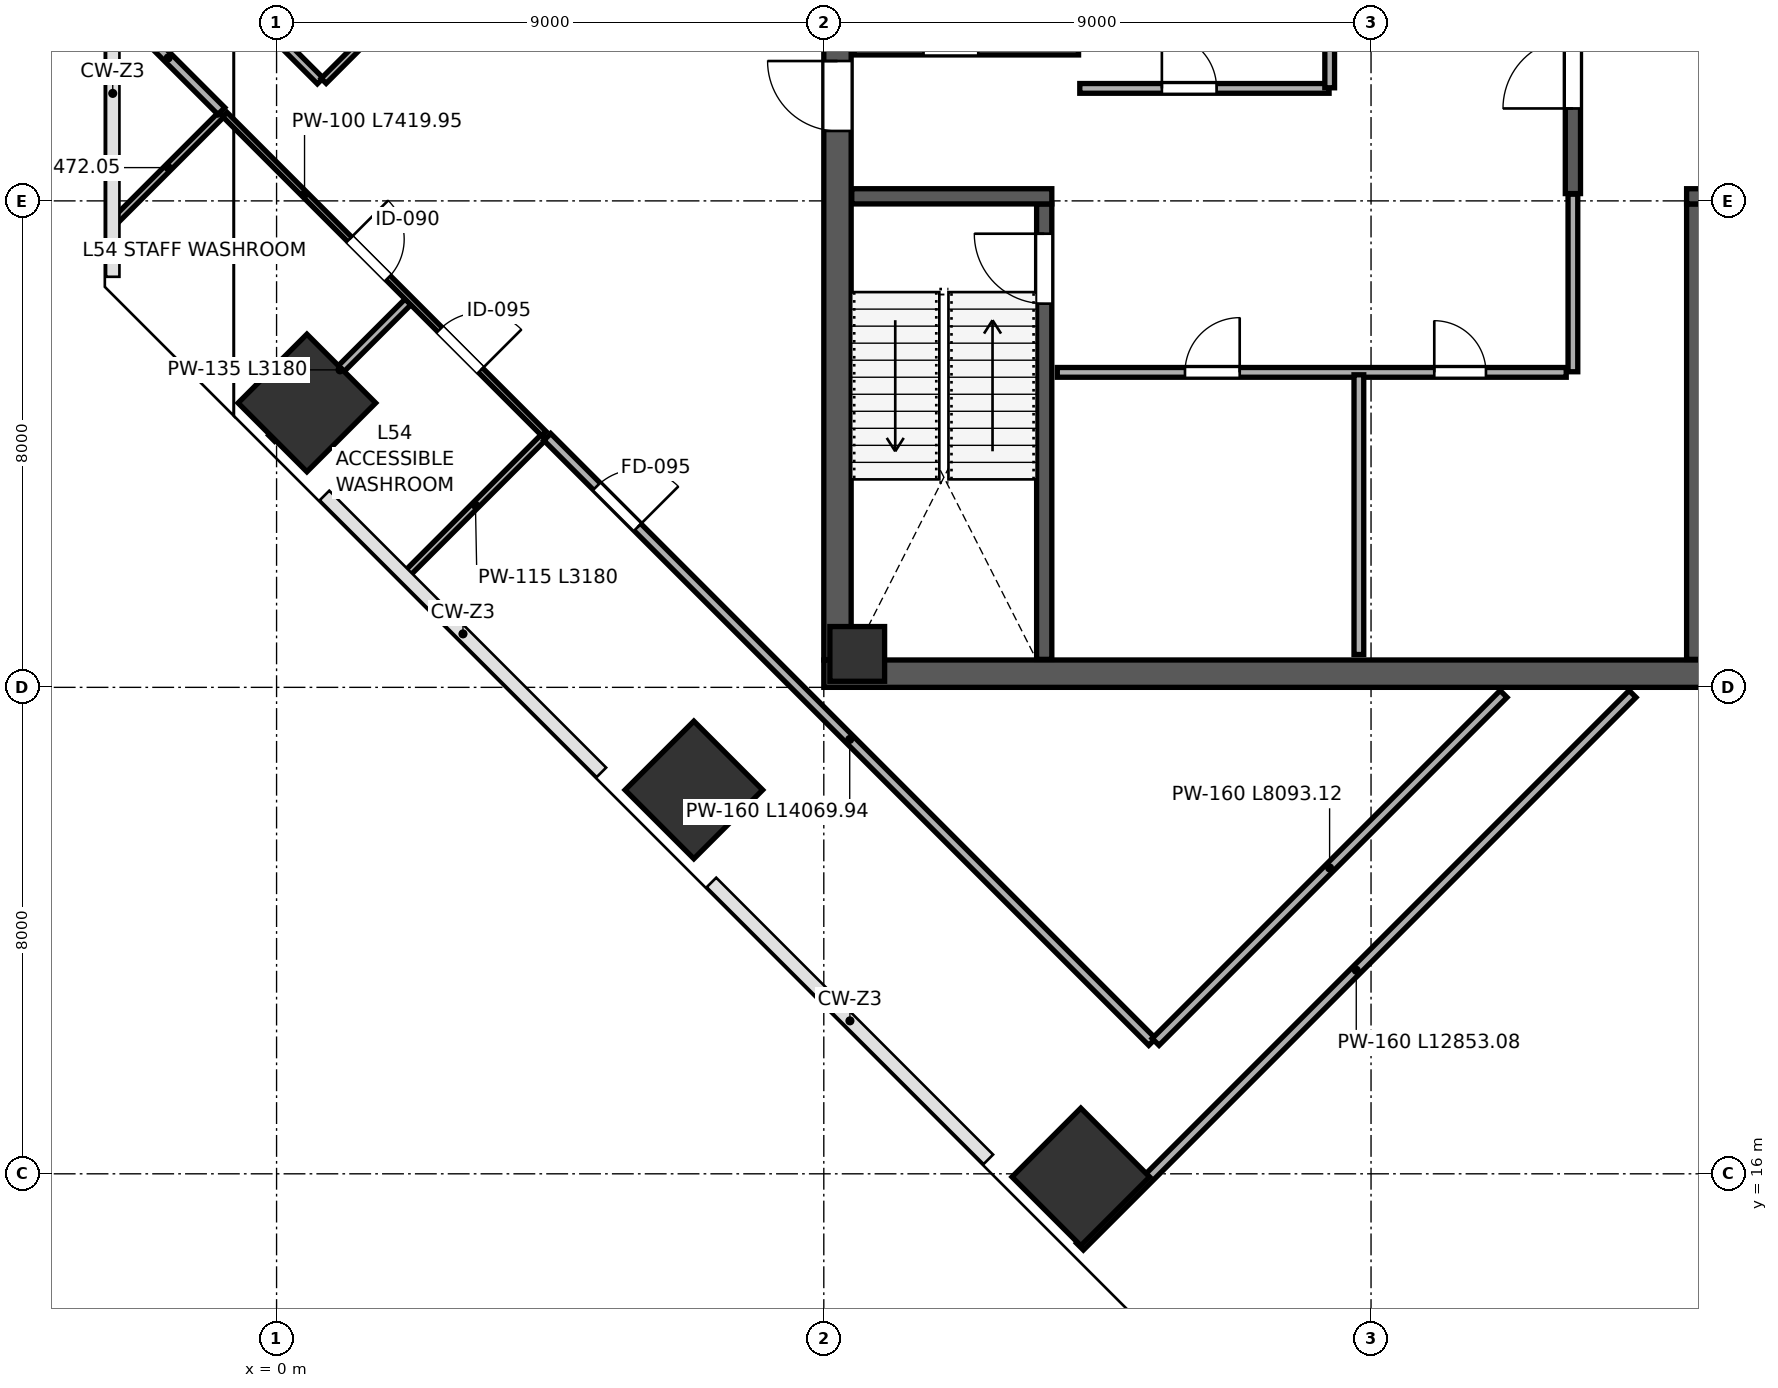
"""IFC4 building model, lengths in metres.
Left out: names, types, materials, properties, quantities, classifications, styles, units other than length and angle.
Written with IfcOpenShell. Run it as: python <this file> out.ifc"""

import sys

from ifc_helpers import new_model, si_unit, direction, frame, frame_2d, origin, origin_2d, place, context, subcontext, project, spatial, rectangle, extrude, source, transform, mapped, element, fill, save


model = new_model("IFC4")
c1 = context("Model", 3, precision=1e-05, world=origin(), true_north=direction((0.0, 1.0)))
c2 = subcontext(c1, "Body", "Model", "MODEL_VIEW")
j1 = project(units=[si_unit("LENGTHUNIT", "METRE"), si_unit("PLANEANGLEUNIT", "RADIAN")], contexts=[c1])
p1 = place(None, origin())
s1 = spatial("IfcSite", under=j1, at=p1, CompositionType="ELEMENT")
p2 = place(p1, origin())
s2 = spatial("IfcBuilding", under=s1, at=p2, CompositionType="ELEMENT")
p3 = place(p2, frame((0.0, 0.0, 241.6)))
s3 = spatial("IfcBuildingStorey", under=s2, at=p3, CompositionType="ELEMENT", Elevation=241.6)
m1 = source(origin(), c2, "Body", "SweptSolid", [
    extrude(rectangle(XDim=0.9, YDim=0.9, at=origin_2d()), origin(), (0.0, 0.0, 1.0), 4.198),
])
p4 = place(p3, frame((9.55, 24.55, 0.001), z_axis=(0.0, 0.0, 1.0), x_axis=(1.0, 0.0, 0.0)))
e1 = element("IfcColumn", 1, at=p4, inside=s3, PredefinedType="COLUMN", context=c2, shape_type="MappedRepresentation", body=[
    mapped(m1, transform((0.0, 0.0, 0.0), scale=1.0)),
])
m2 = source(origin(), c2, "Body", "SweptSolid", [
    extrude(rectangle(XDim=1.6, YDim=1.6, at=origin_2d()), origin(), (0.0, 0.0, 1.0), 4.198),
])
for number, where, z_axis, x_axis in (
    (2, (0.499, 28.677, 0.001), (0.0, 0.0, 1.0), (-0.707, 0.707, 0.0)),
    (3, (6.863, 22.312, 0.001), (0.0, 0.0, 1.0), (-0.707, 0.707, 0.0)),
    (4, (13.227, 15.949, 0.001), (0.0, 0.0, 1.0), (-0.707, 0.707, 0.0)),
):
    element("IfcColumn", number, at=place(p3, frame(where, z_axis=z_axis, x_axis=x_axis)), inside=s3, PredefinedType="COLUMN", context=c2, shape_type="MappedRepresentation", body=[
        mapped(m2, transform((0.0, 0.0, 0.0), scale=1.0)),
    ])
p5 = place(p3, frame((9.225, 24.45, 0.0), z_axis=(0.0, 0.0, 1.0), x_axis=(0.0, 1.0, 0.0)))
e5 = element("IfcWall", 5, at=p5, inside=s3, PredefinedType="SHEAR", context=c2, shape_type="SweptSolid", body=[
    extrude(rectangle(XDim=15.1, YDim=0.45, at=frame_2d((7.55, 0.0))), origin(), (0.0, 0.0, 1.0), 3.96),
])
p6 = place(p5, frame((8.7, 0.0, 0.0)))
e6 = element("IfcOpeningElement", 6, at=p6, cuts=e5, PredefinedType="OPENING", context=c2, shape_type="SweptSolid", body=[
    extrude(rectangle(XDim=1.15, YDim=2.2, at=frame_2d((0.575, 1.1))), frame((0.0, 0.235, 0.0), z_axis=(0.0, -1.0, 0.0), x_axis=(1.0, 0.0, 0.0)), (0.0, 0.0, 1.0), 0.47),
])
p7 = place(p3, frame((9.0, 24.225, 0.0), z_axis=(0.0, 0.0, 1.0), x_axis=(1.0, 0.0, 0.0)))
e7 = element("IfcWall", 7, at=p7, inside=s3, PredefinedType="SHEAR", context=c2, shape_type="SweptSolid", body=[
    extrude(rectangle(XDim=18.0, YDim=0.45, at=frame_2d((9.0, 0.0))), origin(), (0.0, 0.0, 1.0), 3.96),
])
p8 = place(p3, frame((12.625, 24.46, 0.0), z_axis=(0.0, 0.0, 1.0), x_axis=(0.0, 1.0, 0.0)))
e8 = element("IfcWall", 8, at=p8, inside=s3, PredefinedType="SHEAR", context=c2, shape_type="SweptSolid", body=[
    extrude(rectangle(XDim=7.49, YDim=0.25, at=frame_2d((3.745, 0.0))), origin(), (0.0, 0.0, 1.0), 3.96),
])
p9 = place(p8, frame((5.85, 0.0, 0.0)))
e9 = element("IfcOpeningElement", 9, at=p9, cuts=e8, PredefinedType="OPENING", context=c2, shape_type="SweptSolid", body=[
    extrude(rectangle(XDim=1.15, YDim=2.2, at=frame_2d((0.575, 1.1))), frame((0.0, 0.135, 0.0), z_axis=(0.0, -1.0, 0.0), x_axis=(1.0, 0.0, 0.0)), (0.0, 0.0, 1.0), 0.27),
])
p10 = place(p3, frame((9.46, 32.075, 0.0), z_axis=(0.0, 0.0, 1.0), x_axis=(1.0, 0.0, 0.0)))
e10 = element("IfcWall", 10, at=p10, inside=s3, PredefinedType="SHEAR", context=c2, shape_type="SweptSolid", body=[
    extrude(rectangle(XDim=3.29, YDim=0.25, at=frame_2d((1.645, 0.0))), origin(), (0.0, 0.0, 1.0), 3.96),
])
p11 = place(p3, frame((23.315, 24.46, 0.0), z_axis=(0.0, 0.0, 1.0), x_axis=(0.0, 1.0, 0.0)))
e11 = element("IfcWall", 11, at=p11, inside=s3, PredefinedType="SHEAR", context=c2, shape_type="SweptSolid", body=[
    extrude(rectangle(XDim=7.49, YDim=0.25, at=frame_2d((3.745, 0.0))), origin(), (0.0, 0.0, 1.0), 3.96),
])
p12 = place(p3, frame((23.19, 32.075, 0.0), z_axis=(0.0, 0.0, 1.0), x_axis=(1.0, 0.0, 0.0)))
e12 = element("IfcWall", 12, at=p12, inside=s3, PredefinedType="SHEAR", context=c2, shape_type="SweptSolid", body=[
    extrude(rectangle(XDim=3.35, YDim=0.25, at=frame_2d((1.675, 0.0))), origin(), (0.0, 0.0, 1.0), 3.96),
])
p13 = place(p12, frame((0.85, 0.0, 0.0)))
e13 = element("IfcOpeningElement", 13, at=p13, cuts=e12, PredefinedType="OPENING", context=c2, shape_type="SweptSolid", body=[
    extrude(rectangle(XDim=1.15, YDim=2.2, at=frame_2d((0.575, 1.1))), frame((0.0, 0.135, 0.0), z_axis=(0.0, -1.0, 0.0), x_axis=(1.0, 0.0, 0.0)), (0.0, 0.0, 1.0), 0.27),
])
p14 = place(p3, frame((21.32, 32.12, 0.0), z_axis=(0.0, 0.0, 1.0), x_axis=(0.0, 1.0, 0.0)))
e14 = element("IfcWall", 14, at=p14, inside=s3, PredefinedType="SHEAR", context=c2, shape_type="SweptSolid", body=[
    extrude(rectangle(XDim=7.42, YDim=0.25, at=frame_2d((3.71, 0.0))), origin(), (0.0, 0.0, 1.0), 3.96),
])
p15 = place(p14, frame((1.4, 0.0, 0.0)))
e15 = element("IfcOpeningElement", 15, at=p15, cuts=e14, PredefinedType="OPENING", context=c2, shape_type="SweptSolid", body=[
    extrude(rectangle(XDim=1.15, YDim=2.2, at=frame_2d((0.575, 1.1))), frame((0.0, 0.135, 0.0), z_axis=(0.0, -1.0, 0.0), x_axis=(1.0, 0.0, 0.0)), (0.0, 0.0, 1.0), 0.27),
])
p16 = place(p3, frame((9.49, 34.48, 0.0), z_axis=(0.0, 0.0, 1.0), x_axis=(1.0, 0.0, 0.0)))
e16 = element("IfcWall", 16, at=p16, inside=s3, PredefinedType="PARTITIONING", context=c2, shape_type="SweptSolid", body=[
    extrude(rectangle(XDim=3.7, YDim=0.16, at=frame_2d((1.85, 0.0))), origin(), (0.0, 0.0, 1.0), 3.96),
])
p17 = place(p16, frame((1.15, 0.0, 0.0)))
e17 = element("IfcOpeningElement", 17, at=p17, cuts=e16, PredefinedType="OPENING", context=c2, shape_type="SweptSolid", body=[
    extrude(rectangle(XDim=0.9, YDim=2.15, at=frame_2d((0.45, 1.075))), frame((0.0, 0.09, 0.0), z_axis=(0.0, -1.0, 0.0), x_axis=(1.0, 0.0, 0.0)), (0.0, 0.0, 1.0), 0.18),
])
p18 = place(p3, frame((13.21, 33.85, 0.0), z_axis=(0.0, 0.0, 1.0), x_axis=(1.0, 0.0, 0.0)))
e18 = element("IfcWall", 18, at=p18, inside=s3, PredefinedType="PARTITIONING", context=c2, shape_type="SweptSolid", body=[
    extrude(rectangle(XDim=4.1, YDim=0.16, at=frame_2d((2.05, 0.0))), origin(), (0.0, 0.0, 1.0), 3.96),
])
p19 = place(p18, frame((1.35, 0.0, 0.0)))
e19 = element("IfcOpeningElement", 19, at=p19, cuts=e18, PredefinedType="OPENING", context=c2, shape_type="SweptSolid", body=[
    extrude(rectangle(XDim=0.9, YDim=2.15, at=frame_2d((0.45, 1.075))), frame((0.0, 0.09, 0.0), z_axis=(0.0, -1.0, 0.0), x_axis=(1.0, 0.0, 0.0)), (0.0, 0.0, 1.0), 0.18),
])
p20 = place(p3, frame((17.32, 33.86, 0.0), z_axis=(0.0, 0.0, 1.0), x_axis=(0.0, 1.0, 0.0)))
e20 = element("IfcWall", 20, at=p20, inside=s3, PredefinedType="PARTITIONING", context=c2, shape_type="SweptSolid", body=[
    extrude(rectangle(XDim=1.93, YDim=0.16, at=frame_2d((0.965, 0.0))), origin(), (0.0, 0.0, 1.0), 3.96),
])
p21 = place(p3, frame((12.84, 29.18, 0.0), z_axis=(0.0, 0.0, 1.0), x_axis=(1.0, 0.0, 0.0)))
e21 = element("IfcWall", 21, at=p21, inside=s3, PredefinedType="PARTITIONING", context=c2, shape_type="SweptSolid", body=[
    extrude(rectangle(XDim=8.37, YDim=0.16, at=frame_2d((4.185, 0.0))), origin(), (0.0, 0.0, 1.0), 3.96),
])
p22 = place(p21, frame((2.1, 0.0, 0.0)))
e22 = element("IfcOpeningElement", 22, at=p22, cuts=e21, PredefinedType="OPENING", context=c2, shape_type="SweptSolid", body=[
    extrude(rectangle(XDim=0.9, YDim=2.15, at=frame_2d((0.45, 1.075))), frame((0.0, 0.09, 0.0), z_axis=(0.0, -1.0, 0.0), x_axis=(1.0, 0.0, 0.0)), (0.0, 0.0, 1.0), 0.18),
])
p23 = place(p21, frame((6.2, 0.0, 0.0)))
e23 = element("IfcOpeningElement", 23, at=p23, cuts=e21, PredefinedType="OPENING", context=c2, shape_type="SweptSolid", body=[
    extrude(rectangle(XDim=0.85, YDim=2.1, at=frame_2d((0.425, 1.05))), frame((0.0, 0.09, 0.0), z_axis=(0.0, -1.0, 0.0), x_axis=(1.0, 0.0, 0.0)), (0.0, 0.0, 1.0), 0.18),
])
p24 = place(p3, frame((17.8, 24.54, 0.0), z_axis=(0.0, 0.0, 1.0), x_axis=(0.0, 1.0, 0.0)))
e24 = element("IfcWall", 24, at=p24, inside=s3, PredefinedType="PARTITIONING", context=c2, shape_type="SweptSolid", body=[
    extrude(rectangle(XDim=4.6, YDim=0.16, at=frame_2d((2.3, 0.0))), origin(), (0.0, 0.0, 1.0), 3.96),
])
p25 = place(p3, frame((21.32, 29.19, 0.0), z_axis=(0.0, 0.0, 1.0), x_axis=(0.0, 1.0, 0.0)))
e25 = element("IfcWall", 25, at=p25, inside=s3, PredefinedType="PARTITIONING", context=c2, shape_type="SweptSolid", body=[
    extrude(rectangle(XDim=2.92, YDim=0.16, at=frame_2d((1.46, 0.0))), origin(), (0.0, 0.0, 1.0), 3.96),
])
p26 = place(p3, frame((-2.656, 31.673, 0.0), z_axis=(0.0, 0.0, 1.0), x_axis=(0.707106781187, 0.707106781187, 0.0)))
e26 = element("IfcWall", 26, at=p26, inside=s3, PredefinedType="PARTITIONING", context=c2, shape_type="SweptSolid", body=[
    extrude(rectangle(XDim=2.472, YDim=0.115, at=frame_2d((1.236, 0.0))), origin(), (0.0, 0.0, 1.0), 3.96),
])
p27 = place(p3, frame((-2.656, 35.226, 0.0), z_axis=(0.0, 0.0, 1.0), x_axis=(0.707106781187, -0.707106781187, 0.0)))
e27 = element("IfcWall", 27, at=p27, inside=s3, PredefinedType="PARTITIONING", context=c2, shape_type="SweptSolid", body=[
    extrude(rectangle(XDim=2.472, YDim=0.16, at=frame_2d((1.236, 0.0))), origin(), (0.0, 0.0, 1.0), 3.96),
])
p28 = place(p3, frame((-0.081, 28.097, 0.0), z_axis=(0.0, 0.0, 1.0), x_axis=(0.707068394238, 0.707145166051, 0.0)))
e28 = element("IfcWall", 28, at=p28, inside=s3, PredefinedType="PARTITIONING", context=c2, shape_type="SweptSolid", body=[
    extrude(rectangle(XDim=3.18, YDim=0.135, at=frame_2d((1.59, 0.0))), origin(), (0.0, 0.0, 1.0), 3.195),
])
p29 = place(p3, frame((2.146, 25.869, 0.0), z_axis=(0.0, 0.0, 1.0), x_axis=(0.707106781187, 0.707106781187, 0.0)))
e29 = element("IfcWall", 29, at=p29, inside=s3, PredefinedType="PARTITIONING", context=c2, shape_type="SweptSolid", body=[
    extrude(rectangle(XDim=3.18, YDim=0.115, at=frame_2d((1.59, 0.0))), origin(), (0.0, 0.0, 1.0), 3.195),
])
p30 = place(p3, frame((-0.852, 33.421, 0.0), z_axis=(0.0, 0.0, 1.0), x_axis=(0.707090329382, -0.707123232608, 0.0)))
e30 = element("IfcWall", 30, at=p30, inside=s3, PredefinedType="PARTITIONING", context=c2, shape_type="SweptSolid", body=[
    extrude(rectangle(XDim=7.42, YDim=0.1, at=frame_2d((3.71, 0.0))), origin(), (0.0, 0.0, 1.0), 3.96),
])
p31 = place(p30, frame((2.9, 0.0, 0.0)))
e31 = element("IfcOpeningElement", 31, at=p31, cuts=e30, PredefinedType="OPENING", context=c2, shape_type="SweptSolid", body=[
    extrude(rectangle(XDim=0.9, YDim=2.15, at=frame_2d((0.45, 1.075))), frame((0.0, 0.06, 0.0), z_axis=(0.0, -1.0, 0.0), x_axis=(1.0, 0.0, 0.0)), (0.0, 0.0, 1.0), 0.12),
])
p32 = place(p30, frame((5.0, 0.0, 0.0)))
e32 = element("IfcOpeningElement", 32, at=p32, cuts=e30, PredefinedType="OPENING", context=c2, shape_type="SweptSolid", body=[
    extrude(rectangle(XDim=0.95, YDim=2.15, at=frame_2d((0.475, 1.075))), frame((0.0, 0.06, 0.0), z_axis=(0.0, -1.0, 0.0), x_axis=(1.0, 0.0, 0.0)), (0.0, 0.0, 1.0), 0.12),
])
p33 = place(p3, frame((4.452, 28.118, 0.0), z_axis=(0.0, 0.0, 1.0), x_axis=(0.707106781187, -0.707106781187, 0.0)))
e33 = element("IfcWall", 33, at=p33, inside=s3, PredefinedType="PARTITIONING", context=c2, shape_type="SweptSolid", body=[
    extrude(rectangle(XDim=14.07, YDim=0.16, at=frame_2d((7.035, 0.0))), origin(), (0.0, 0.0, 1.0), 3.96),
])
p34 = place(p33, frame((1.15, 0.0, 0.0)))
e34 = element("IfcOpeningElement", 34, at=p34, cuts=e33, PredefinedType="OPENING", context=c2, shape_type="SweptSolid", body=[
    extrude(rectangle(XDim=0.95, YDim=2.15, at=frame_2d((0.475, 1.075))), frame((0.0, 0.09, 0.0), z_axis=(0.0, -1.0, 0.0), x_axis=(1.0, 0.0, 0.0)), (0.0, 0.0, 1.0), 0.18),
])
p35 = place(p3, frame((14.457, 18.169, 0.0), z_axis=(0.0, 0.0, 1.0), x_axis=(0.707106781187, 0.707106781187, 0.0)))
e35 = element("IfcWall", 35, at=p35, inside=s3, PredefinedType="PARTITIONING", context=c2, shape_type="SweptSolid", body=[
    extrude(rectangle(XDim=8.093, YDim=0.16, at=frame_2d((4.046, 0.0))), origin(), (0.0, 0.0, 1.0), 3.96),
])
p36 = place(p3, frame((-2.414, 37.105, 0.0), z_axis=(0.0, 0.0, 1.0), x_axis=(0.707106781187, -0.707106781187, 0.0)))
e36 = element("IfcWall", 36, at=p36, inside=s3, PredefinedType="PARTITIONING", context=c2, shape_type="SweptSolid", body=[
    extrude(rectangle(XDim=4.43, YDim=0.135, at=frame_2d((2.215, 0.0))), origin(), (0.0, 0.0, 1.0), 3.96),
])
p37 = place(p3, frame((0.775, 33.973, 0.0), z_axis=(0.0, 0.0, 1.0), x_axis=(0.707106781187, 0.707106781187, 0.0)))
e37 = element("IfcWall", 37, at=p37, inside=s3, PredefinedType="PARTITIONING", context=c2, shape_type="SweptSolid", body=[
    extrude(rectangle(XDim=29.28, YDim=0.115, at=frame_2d((14.64, 0.0))), origin(), (0.0, 0.0, 1.0), 3.96),
])
p38 = place(p37, frame((2.2, 0.0, 0.0)))
e38 = element("IfcOpeningElement", 38, at=p38, cuts=e37, PredefinedType="OPENING", context=c2, shape_type="SweptSolid", body=[
    extrude(rectangle(XDim=0.95, YDim=2.15, at=frame_2d((0.475, 1.075))), frame((0.0, 0.067, 0.0), z_axis=(0.0, -1.0, 0.0), x_axis=(1.0, 0.0, 0.0)), (0.0, 0.0, 1.0), 0.135),
])
p39 = place(p3, frame((13.213, 14.803, 0.0), z_axis=(0.0, 0.0, 1.0), x_axis=(0.707116278481, 0.707097283765, 0.0)))
e39 = element("IfcWall", 39, at=p39, inside=s3, PredefinedType="PARTITIONING", context=c2, shape_type="SweptSolid", body=[
    extrude(rectangle(XDim=12.853, YDim=0.16, at=frame_2d((6.427, 0.0))), origin(), (0.0, 0.0, 1.0), 3.96),
])
m3 = source(origin(), c2, "Body", "SweptSolid", [
    extrude(rectangle(XDim=1.15, YDim=2.2, at=frame_2d((0.575, 1.1))), frame((0.0, 0.025, 0.0), z_axis=(0.0, -1.0, 0.0), x_axis=(1.0, 0.0, 0.0)), (0.0, 0.0, 1.0), 0.05),
])
p40 = place(p9, origin())
e40 = element("IfcDoor", 40, at=p40, inside=s3, OperationType="SINGLE_SWING_RIGHT", PredefinedType="DOOR", context=c2, shape_type="MappedRepresentation", body=[
    mapped(m3, transform((0.0, 0.0, 0.0), scale=1.0)),
])
fill(e9, e40)
m4 = source(origin(), c2, "Body", "SweptSolid", [
    extrude(rectangle(XDim=1.15, YDim=2.2, at=frame_2d((0.575, 1.1))), frame((0.0, 0.025, 0.0), z_axis=(0.0, -1.0, 0.0), x_axis=(1.0, 0.0, 0.0)), (0.0, 0.0, 1.0), 0.05),
])
p41 = place(p15, origin())
e41 = element("IfcDoor", 41, at=p41, inside=s3, OperationType="SINGLE_SWING_LEFT", PredefinedType="DOOR", context=c2, shape_type="MappedRepresentation", body=[
    mapped(m4, transform((0.0, 0.0, 0.0), scale=1.0)),
])
fill(e15, e41)
p42 = place(p6, origin())
e42 = element("IfcDoor", 42, at=p42, inside=s3, OperationType="SINGLE_SWING_RIGHT", PredefinedType="DOOR", context=c2, shape_type="MappedRepresentation", body=[
    mapped(m4, transform((0.0, 0.0, 0.0), scale=1.0)),
])
fill(e6, e42)
m5 = source(origin(), c2, "Body", "SweptSolid", [
    extrude(rectangle(XDim=0.9, YDim=2.15, at=frame_2d((0.45, 1.075))), frame((0.0, 0.025, 0.0), z_axis=(0.0, -1.0, 0.0), x_axis=(1.0, 0.0, 0.0)), (0.0, 0.0, 1.0), 0.05),
])
p43 = place(p19, origin())
e43 = element("IfcDoor", 43, at=p43, inside=s3, OperationType="SINGLE_SWING_LEFT", PredefinedType="DOOR", context=c2, shape_type="MappedRepresentation", body=[
    mapped(m5, transform((0.0, 0.0, 0.0), scale=1.0)),
])
fill(e19, e43)
p44 = place(p22, origin())
e44 = element("IfcDoor", 44, at=p44, inside=s3, OperationType="SINGLE_SWING_RIGHT", PredefinedType="DOOR", context=c2, shape_type="MappedRepresentation", body=[
    mapped(m5, transform((0.0, 0.0, 0.0), scale=1.0)),
])
fill(e22, e44)
m6 = source(origin(), c2, "Body", "SweptSolid", [
    extrude(rectangle(XDim=0.85, YDim=2.1, at=frame_2d((0.425, 1.05))), frame((0.0, 0.025, 0.0), z_axis=(0.0, -1.0, 0.0), x_axis=(1.0, 0.0, 0.0)), (0.0, 0.0, 1.0), 0.05),
])
p45 = place(p23, origin())
e45 = element("IfcDoor", 45, at=p45, inside=s3, OperationType="SINGLE_SWING_LEFT", PredefinedType="DOOR", context=c2, shape_type="MappedRepresentation", body=[
    mapped(m6, transform((0.0, 0.0, 0.0), scale=1.0)),
])
fill(e23, e45)
m7 = source(origin(), c2, "Body", "SweptSolid", [
    extrude(rectangle(XDim=0.9, YDim=2.15, at=frame_2d((0.45, 1.075))), frame((0.0, 0.025, 0.0), z_axis=(0.0, -1.0, 0.0), x_axis=(1.0, 0.0, 0.0)), (0.0, 0.0, 1.0), 0.05),
])
p46 = place(p31, origin())
e46 = element("IfcDoor", 46, at=p46, inside=s3, OperationType="SINGLE_SWING_LEFT", PredefinedType="DOOR", context=c2, shape_type="MappedRepresentation", body=[
    mapped(m7, transform((0.0, 0.0, 0.0), scale=1.0)),
])
fill(e31, e46)
m8 = source(origin(), c2, "Body", "SweptSolid", [
    extrude(rectangle(XDim=0.95, YDim=2.15, at=frame_2d((0.475, 1.075))), frame((0.0, 0.025, 0.0), z_axis=(0.0, -1.0, 0.0), x_axis=(1.0, 0.0, 0.0)), (0.0, 0.0, 1.0), 0.05),
])
p47 = place(p32, origin())
e47 = element("IfcDoor", 47, at=p47, inside=s3, OperationType="SINGLE_SWING_RIGHT", PredefinedType="DOOR", context=c2, shape_type="MappedRepresentation", body=[
    mapped(m8, transform((0.0, 0.0, 0.0), scale=1.0)),
])
fill(e32, e47)
m9 = source(origin(), c2, "Body", "SweptSolid", [
    extrude(rectangle(XDim=0.95, YDim=2.15, at=frame_2d((0.475, 1.075))), frame((0.0, 0.025, 0.0), z_axis=(0.0, -1.0, 0.0), x_axis=(1.0, 0.0, 0.0)), (0.0, 0.0, 1.0), 0.05),
])
p48 = place(p34, origin())
e48 = element("IfcDoor", 48, at=p48, inside=s3, OperationType="SINGLE_SWING_RIGHT", PredefinedType="DOOR", context=c2, shape_type="MappedRepresentation", body=[
    mapped(m9, transform((0.0, 0.0, 0.0), scale=1.0)),
])
fill(e34, e48)
save(model, sys.argv[1])
